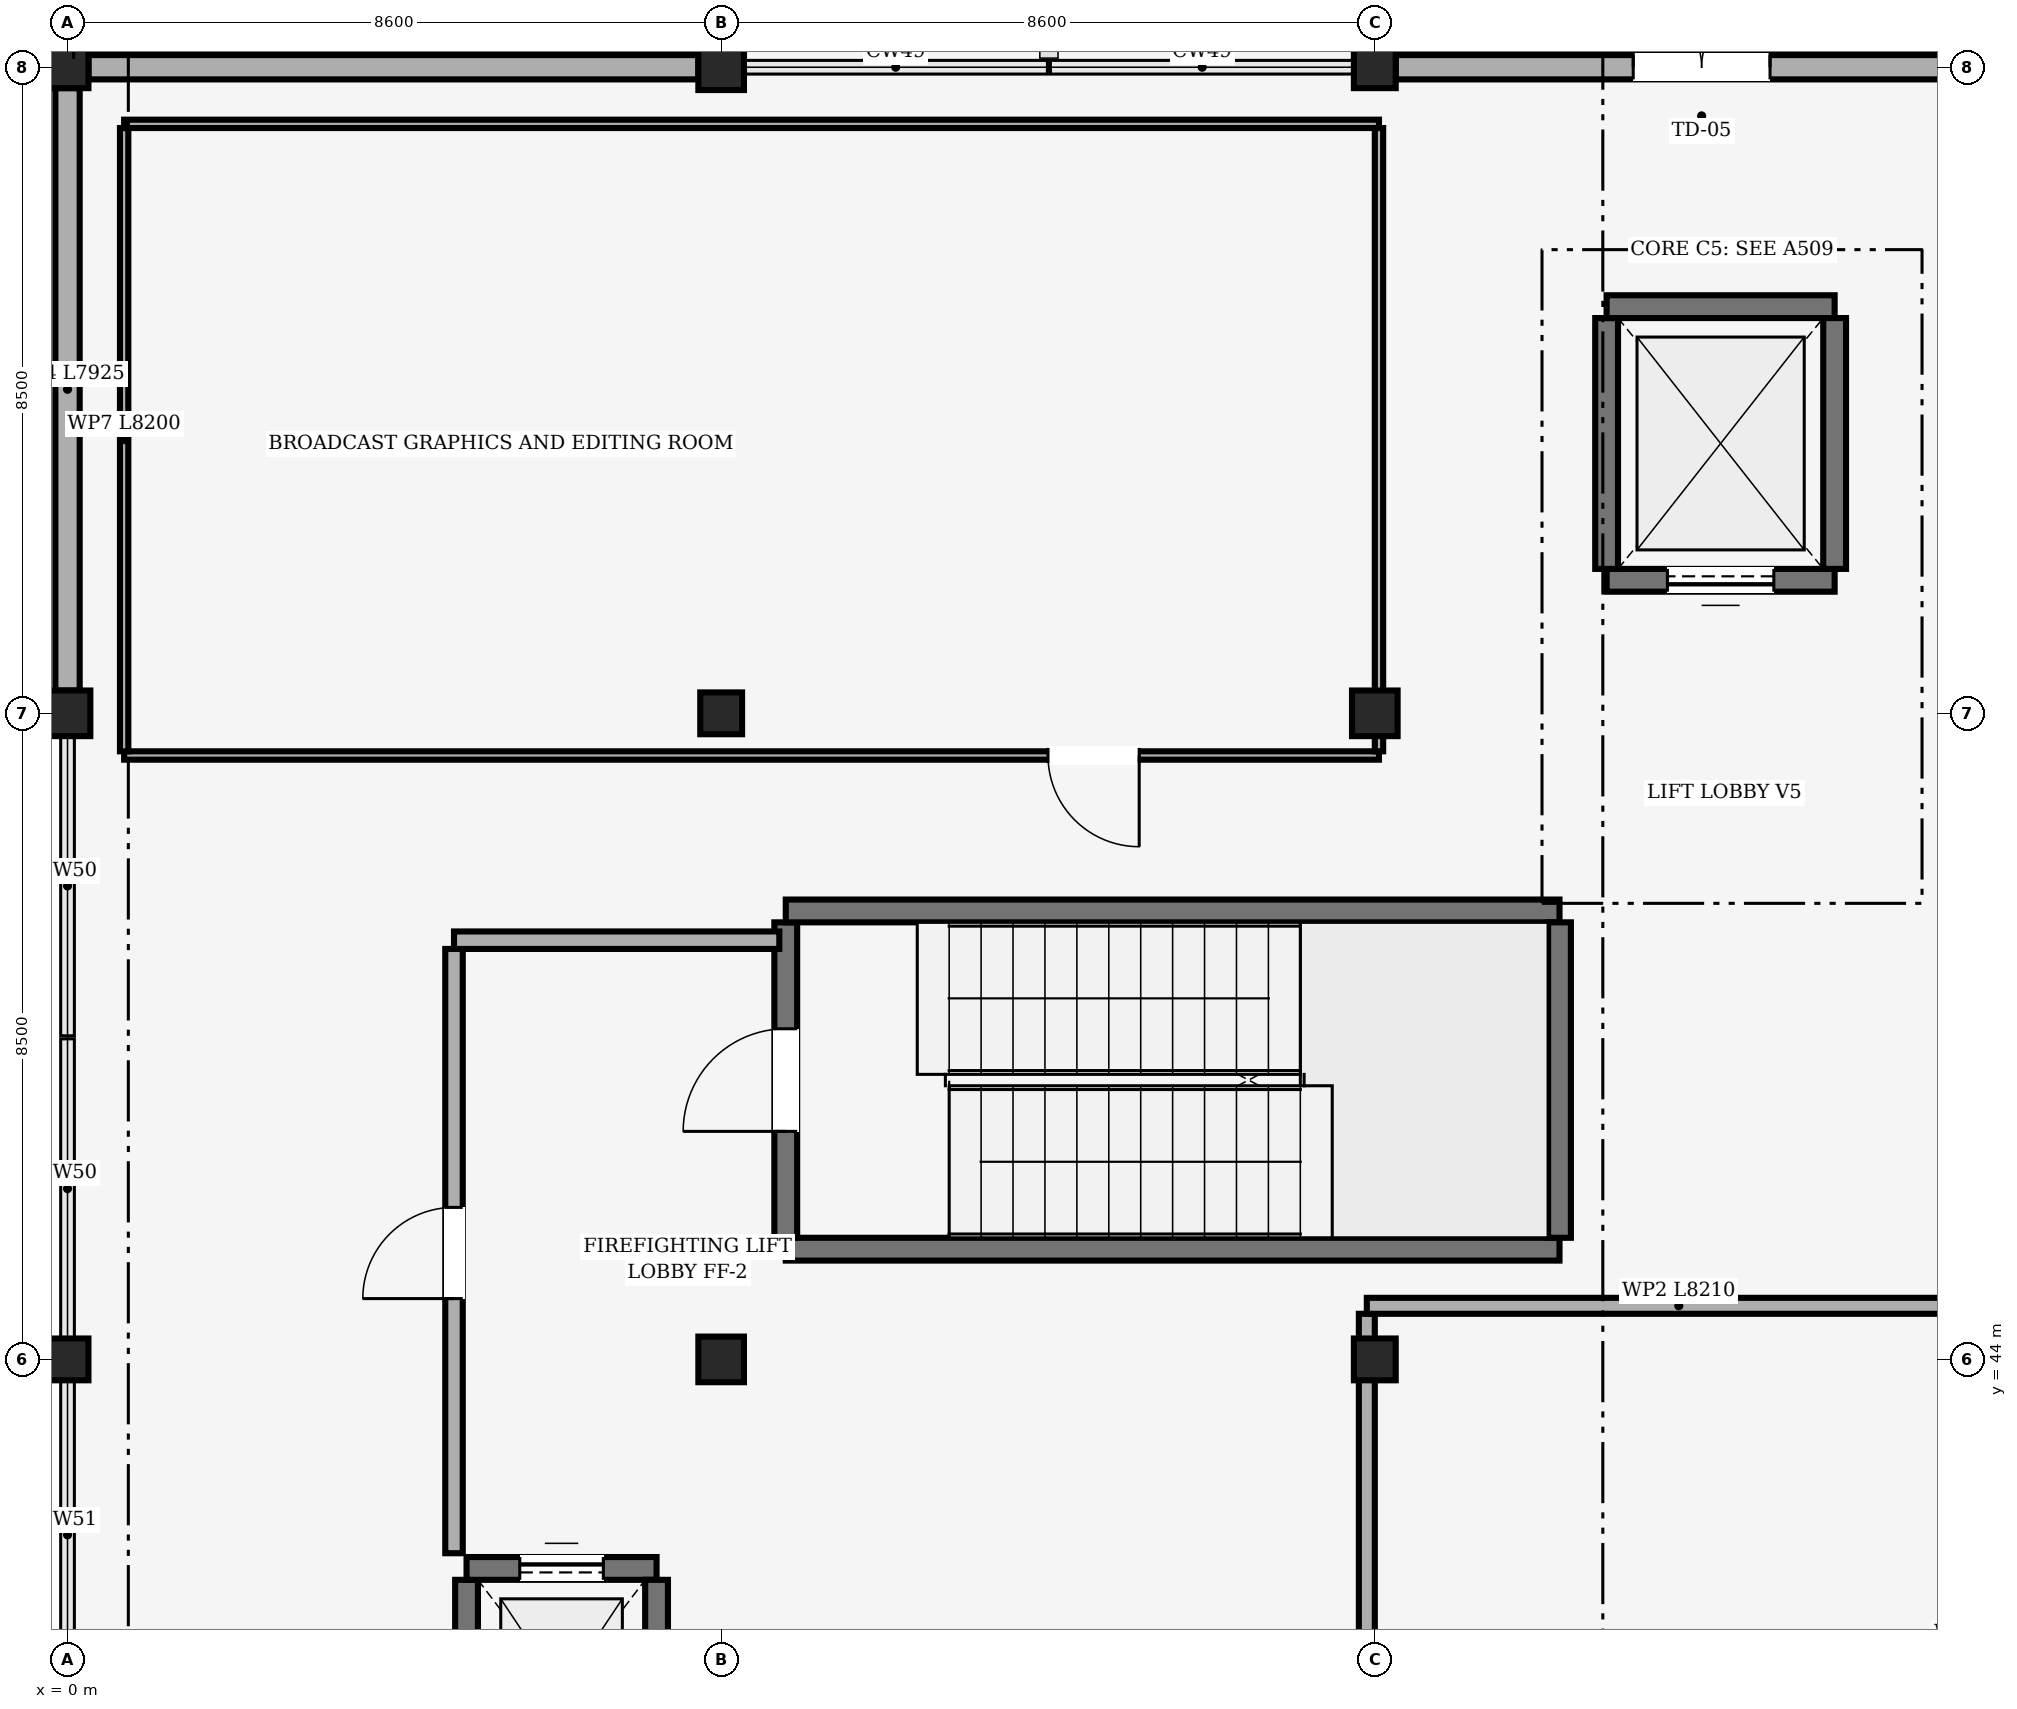
"""IFC4 building model, lengths in metres.
Left out: names, types, materials, properties, quantities, classifications, styles, units other than length and angle.
Written with IfcOpenShell. Run it as: python <this file> out.ifc"""

import sys

from ifc_helpers import new_model, si_unit, direction, frame, frame_2d, origin, origin_2d, place, context, subcontext, project, spatial, rectangle, extrude, element, fill, save


model = new_model("IFC4")
c1 = context("Model", 3, precision=1e-05, world=origin(), true_north=direction((0.0, 1.0)))
c2 = subcontext(c1, "Body", "Model", "MODEL_VIEW")
j1 = project(units=[si_unit("LENGTHUNIT", "METRE"), si_unit("PLANEANGLEUNIT", "RADIAN")], contexts=[c1])
p1 = place(None, origin())
s1 = spatial("IfcSite", under=j1, at=p1, CompositionType="ELEMENT")
p2 = place(p1, origin())
s2 = spatial("IfcBuilding", under=s1, at=p2, CompositionType="ELEMENT")
p3 = place(p2, frame((0.0, 0.0, 15.6)))
s3 = spatial("IfcBuildingStorey", under=s2, at=p3, CompositionType="ELEMENT", Elevation=15.6)
p4 = place(p3, frame((0.0, 44.0, 0.0), z_axis=(0.0, 0.0, 1.0), x_axis=(1.0, 0.0, 0.0)))
e1 = element("IfcColumn", 1, at=p4, inside=s3, PredefinedType="COLUMN", context=c2, shape_type="SweptSolid", body=[
    extrude(rectangle(XDim=0.55, YDim=0.55, at=origin_2d()), origin(), (0.0, 0.0, 1.0), 3.2),
])
p5 = place(p3, frame((0.0, 52.5, 0.0), z_axis=(0.0, 0.0, 1.0), x_axis=(1.0, 0.0, 0.0)))
e2 = element("IfcColumn", 2, at=p5, inside=s3, PredefinedType="COLUMN", context=c2, shape_type="SweptSolid", body=[
    extrude(rectangle(XDim=0.6, YDim=0.6, at=origin_2d()), origin(), (0.0, 0.0, 1.0), 3.2),
])
p6 = place(p3, frame((0.0, 61.0, 0.0), z_axis=(0.0, 0.0, 1.0), x_axis=(1.0, 0.0, 0.0)))
e3 = element("IfcColumn", 3, at=p6, inside=s3, PredefinedType="COLUMN", context=c2, shape_type="SweptSolid", body=[
    extrude(rectangle(XDim=0.55, YDim=0.55, at=origin_2d()), origin(), (0.0, 0.0, 1.0), 3.2),
])
p7 = place(p3, frame((8.6, 44.0, 0.0), z_axis=(0.0, 0.0, 1.0), x_axis=(1.0, 0.0, 0.0)))
e4 = element("IfcColumn", 4, at=p7, inside=s3, PredefinedType="COLUMN", context=c2, shape_type="SweptSolid", body=[
    extrude(rectangle(XDim=0.6, YDim=0.6, at=origin_2d()), origin(), (0.0, 0.0, 1.0), 3.2),
])
p8 = place(p3, frame((8.6, 52.5, 0.0), z_axis=(0.0, 0.0, 1.0), x_axis=(1.0, 0.0, 0.0)))
e5 = element("IfcColumn", 5, at=p8, inside=s3, PredefinedType="COLUMN", context=c2, shape_type="SweptSolid", body=[
    extrude(rectangle(XDim=0.55, YDim=0.55, at=origin_2d()), origin(), (0.0, 0.0, 1.0), 3.2),
])
p9 = place(p3, frame((8.6, 61.0, 0.0), z_axis=(0.0, 0.0, 1.0), x_axis=(1.0, 0.0, 0.0)))
e6 = element("IfcColumn", 6, at=p9, inside=s3, PredefinedType="COLUMN", context=c2, shape_type="SweptSolid", body=[
    extrude(rectangle(XDim=0.6, YDim=0.6, at=origin_2d()), origin(), (0.0, 0.0, 1.0), 3.2),
])
p10 = place(p3, frame((17.2, 44.0, 0.0), z_axis=(0.0, 0.0, 1.0), x_axis=(1.0, 0.0, 0.0)))
e7 = element("IfcColumn", 7, at=p10, inside=s3, PredefinedType="COLUMN", context=c2, shape_type="SweptSolid", body=[
    extrude(rectangle(XDim=0.55, YDim=0.55, at=origin_2d()), origin(), (0.0, 0.0, 1.0), 3.2),
])
p11 = place(p3, frame((17.2, 52.5, 0.0), z_axis=(0.0, 0.0, 1.0), x_axis=(1.0, 0.0, 0.0)))
e8 = element("IfcColumn", 8, at=p11, inside=s3, PredefinedType="COLUMN", context=c2, shape_type="SweptSolid", body=[
    extrude(rectangle(XDim=0.6, YDim=0.6, at=origin_2d()), origin(), (0.0, 0.0, 1.0), 3.2),
])
p12 = place(p3, frame((17.2, 61.0, 0.0), z_axis=(0.0, 0.0, 1.0), x_axis=(1.0, 0.0, 0.0)))
e9 = element("IfcColumn", 9, at=p12, inside=s3, PredefinedType="COLUMN", context=c2, shape_type="SweptSolid", body=[
    extrude(rectangle(XDim=0.55, YDim=0.55, at=origin_2d()), origin(), (0.0, 0.0, 1.0), 3.2),
])
p13 = place(p3, frame((0.275, 61.0, 0.0), z_axis=(0.0, 0.0, 1.0), x_axis=(1.0, 0.0, 0.0)))
e10 = element("IfcWall", 10, at=p13, inside=s3, PredefinedType="SOLIDWALL", context=c2, shape_type="SweptSolid", body=[
    extrude(rectangle(XDim=8.025, YDim=0.32, at=frame_2d((4.013, 0.0))), origin(), (0.0, 0.0, 1.0), 2.585),
])
p14 = place(p3, frame((17.475, 61.0, 0.0), z_axis=(0.0, 0.0, 1.0), x_axis=(1.0, 0.0, 0.0)))
e11 = element("IfcWall", 11, at=p14, inside=s3, PredefinedType="SOLIDWALL", context=c2, shape_type="SweptSolid", body=[
    extrude(rectangle(XDim=8.025, YDim=0.32, at=frame_2d((4.012, 0.0))), origin(), (0.0, 0.0, 1.0), 2.535),
])
p15 = place(p14, frame((3.125, 0.0, 0.0)))
e12 = element("IfcOpeningElement", 12, at=p15, cuts=e11, PredefinedType="OPENING", context=c2, shape_type="SweptSolid", body=[
    extrude(rectangle(XDim=1.8, YDim=2.2, at=frame_2d((0.9, 1.1))), frame((0.0, 0.16, 0.0), z_axis=(0.0, -1.0, 0.0), x_axis=(1.0, 0.0, 0.0)), (0.0, 0.0, 1.0), 0.32),
])
p16 = place(p3, frame((0.0, 60.725, 0.0), z_axis=(0.0, 0.0, 1.0), x_axis=(0.0, -1.0, 0.0)))
e13 = element("IfcWall", 13, at=p16, inside=s3, PredefinedType="SOLIDWALL", context=c2, shape_type="SweptSolid", body=[
    extrude(rectangle(XDim=7.925, YDim=0.32, at=frame_2d((3.962, 0.0))), origin(), (0.0, 0.0, 1.0), 2.435),
])
p17 = place(p3, frame((19.63, 45.45, 0.0), z_axis=(0.0, 0.0, 1.0), x_axis=(-1.0, 0.0, 0.0)))
e14 = element("IfcWall", 14, at=p17, inside=s3, PredefinedType="SHEAR", context=c2, shape_type="SweptSolid", body=[
    extrude(rectangle(XDim=10.18, YDim=0.3, at=frame_2d((5.09, 0.0))), origin(), (0.0, 0.0, 1.0), 3.2),
])
p18 = place(p3, frame((9.45, 45.6, 0.0), z_axis=(0.0, 0.0, 1.0), x_axis=(0.0, 1.0, 0.0)))
e15 = element("IfcWall", 15, at=p18, inside=s3, PredefinedType="SHEAR", context=c2, shape_type="SweptSolid", body=[
    extrude(rectangle(XDim=4.15, YDim=0.3, at=frame_2d((2.075, 0.0))), origin(), (0.0, 0.0, 1.0), 3.2),
])
p19 = place(p18, frame((1.4, 0.0, 0.0)))
e16 = element("IfcOpeningElement", 16, at=p19, cuts=e15, PredefinedType="OPENING", context=c2, shape_type="SweptSolid", body=[
    extrude(rectangle(XDim=1.35, YDim=2.2, at=frame_2d((0.675, 1.1))), frame((0.0, 0.15, 0.0), z_axis=(0.0, -1.0, 0.0), x_axis=(1.0, 0.0, 0.0)), (0.0, 0.0, 1.0), 0.3),
])
p20 = place(p3, frame((9.45, 49.9, 0.0), z_axis=(0.0, 0.0, 1.0), x_axis=(1.0, 0.0, 0.0)))
e17 = element("IfcWall", 17, at=p20, inside=s3, PredefinedType="SHEAR", context=c2, shape_type="SweptSolid", body=[
    extrude(rectangle(XDim=10.18, YDim=0.3, at=frame_2d((5.09, 0.0))), origin(), (0.0, 0.0, 1.0), 3.2),
])
p21 = place(p3, frame((19.63, 49.75, 0.0), z_axis=(0.0, 0.0, 1.0), x_axis=(0.0, -1.0, 0.0)))
e18 = element("IfcWall", 18, at=p21, inside=s3, PredefinedType="SHEAR", context=c2, shape_type="SweptSolid", body=[
    extrude(rectangle(XDim=4.15, YDim=0.3, at=frame_2d((2.075, 0.0))), origin(), (0.0, 0.0, 1.0), 3.2),
])
p22 = place(p3, frame((5.25, 38.2, 0.0), z_axis=(0.0, 0.0, 1.0), x_axis=(0.0, 1.0, 0.0)))
e19 = element("IfcWall", 19, at=p22, inside=s3, PredefinedType="SHEAR", context=c2, shape_type="SweptSolid", body=[
    extrude(rectangle(XDim=2.9, YDim=0.3, at=frame_2d((1.45, 0.0))), origin(), (0.0, 0.0, 1.0), 3.2),
])
p23 = place(p3, frame((5.25, 41.25, 0.0), z_axis=(0.0, 0.0, 1.0), x_axis=(1.0, 0.0, 0.0)))
e20 = element("IfcWall", 20, at=p23, inside=s3, PredefinedType="SHEAR", context=c2, shape_type="SweptSolid", body=[
    extrude(rectangle(XDim=2.5, YDim=0.3, at=frame_2d((1.25, 0.0))), origin(), (0.0, 0.0, 1.0), 3.2),
])
p24 = place(p23, frame((0.7, 0.0, 0.0)))
e21 = element("IfcOpeningElement", 21, at=p24, cuts=e20, PredefinedType="OPENING", context=c2, shape_type="SweptSolid", body=[
    extrude(rectangle(XDim=1.1, YDim=2.1, at=frame_2d((0.55, 1.05))), frame((0.0, 0.15, 0.0), z_axis=(0.0, -1.0, 0.0), x_axis=(1.0, 0.0, 0.0)), (0.0, 0.0, 1.0), 0.3),
])
p25 = place(p3, frame((7.75, 41.1, 0.0), z_axis=(0.0, 0.0, 1.0), x_axis=(0.0, -1.0, 0.0)))
e22 = element("IfcWall", 22, at=p25, inside=s3, PredefinedType="SHEAR", context=c2, shape_type="SweptSolid", body=[
    extrude(rectangle(XDim=2.9, YDim=0.3, at=frame_2d((1.45, 0.0))), origin(), (0.0, 0.0, 1.0), 3.2),
])
p26 = place(p3, frame((23.25, 54.25, 0.0), z_axis=(0.0, 0.0, 1.0), x_axis=(-1.0, 0.0, 0.0)))
e23 = element("IfcWall", 23, at=p26, inside=s3, PredefinedType="SHEAR", context=c2, shape_type="SweptSolid", body=[
    extrude(rectangle(XDim=3.0, YDim=0.3, at=frame_2d((1.5, 0.0))), origin(), (0.0, 0.0, 1.0), 3.2),
])
p27 = place(p26, frame((0.8, 0.0, 0.0)))
e24 = element("IfcOpeningElement", 24, at=p27, cuts=e23, PredefinedType="OPENING", context=c2, shape_type="SweptSolid", body=[
    extrude(rectangle(XDim=1.4, YDim=2.2, at=frame_2d((0.7, 1.1))), frame((0.0, 0.15, 0.0), z_axis=(0.0, -1.0, 0.0), x_axis=(1.0, 0.0, 0.0)), (0.0, 0.0, 1.0), 0.3),
])
p28 = place(p3, frame((20.25, 54.4, 0.0), z_axis=(0.0, 0.0, 1.0), x_axis=(0.0, 1.0, 0.0)))
e25 = element("IfcWall", 25, at=p28, inside=s3, PredefinedType="SHEAR", context=c2, shape_type="SweptSolid", body=[
    extrude(rectangle(XDim=3.3, YDim=0.3, at=frame_2d((1.65, 0.0))), origin(), (0.0, 0.0, 1.0), 3.2),
])
p29 = place(p3, frame((20.25, 57.85, 0.0), z_axis=(0.0, 0.0, 1.0), x_axis=(1.0, 0.0, 0.0)))
e26 = element("IfcWall", 26, at=p29, inside=s3, PredefinedType="SHEAR", context=c2, shape_type="SweptSolid", body=[
    extrude(rectangle(XDim=3.0, YDim=0.3, at=frame_2d((1.5, 0.0))), origin(), (0.0, 0.0, 1.0), 3.2),
])
p30 = place(p3, frame((23.25, 57.7, 0.0), z_axis=(0.0, 0.0, 1.0), x_axis=(0.0, -1.0, 0.0)))
e27 = element("IfcWall", 27, at=p30, inside=s3, PredefinedType="SHEAR", context=c2, shape_type="SweptSolid", body=[
    extrude(rectangle(XDim=3.3, YDim=0.3, at=frame_2d((1.65, 0.0))), origin(), (0.0, 0.0, 1.0), 3.2),
])
p31 = place(p3, frame((5.085, 41.45, 0.0), z_axis=(0.0, 0.0, 1.0), x_axis=(0.0, 1.0, 0.0)))
e28 = element("IfcWall", 28, at=p31, inside=s3, PredefinedType="PARTITIONING", context=c2, shape_type="SweptSolid", body=[
    extrude(rectangle(XDim=7.95, YDim=0.23, at=frame_2d((3.975, 0.0))), origin(), (0.0, 0.0, 1.0), 3.18),
])
p32 = place(p31, frame((3.35, 0.0, 0.0)))
e29 = element("IfcOpeningElement", 29, at=p32, cuts=e28, PredefinedType="OPENING", context=c2, shape_type="SweptSolid", body=[
    extrude(rectangle(XDim=1.2, YDim=2.15, at=frame_2d((0.6, 1.075))), frame((0.0, 0.115, 0.0), z_axis=(0.0, -1.0, 0.0), x_axis=(1.0, 0.0, 0.0)), (0.0, 0.0, 1.0), 0.23),
])
p33 = place(p3, frame((5.085, 49.515, 0.0), z_axis=(0.0, 0.0, 1.0), x_axis=(1.0, 0.0, 0.0)))
e30 = element("IfcWall", 30, at=p33, inside=s3, PredefinedType="PARTITIONING", context=c2, shape_type="SweptSolid", body=[
    extrude(rectangle(XDim=4.28, YDim=0.23, at=frame_2d((2.14, 0.0))), origin(), (0.0, 0.0, 1.0), 3.18),
])
p34 = place(p3, frame((17.095, 35.8, 0.0), z_axis=(0.0, 0.0, 1.0), x_axis=(0.0, 1.0, 0.0)))
e31 = element("IfcWall", 31, at=p34, inside=s3, PredefinedType="PARTITIONING", context=c2, shape_type="SweptSolid", body=[
    extrude(rectangle(XDim=8.8, YDim=0.21, at=frame_2d((4.4, 0.0))), origin(), (0.0, 0.0, 1.0), 2.53),
])
p35 = place(p34, frame((3.0, 0.0, 0.0)))
e32 = element("IfcOpeningElement", 32, at=p35, cuts=e31, PredefinedType="OPENING", context=c2, shape_type="SweptSolid", body=[
    extrude(rectangle(XDim=1.4, YDim=2.15, at=frame_2d((0.7, 1.075))), frame((0.0, 0.105, 0.0), z_axis=(0.0, -1.0, 0.0), x_axis=(1.0, 0.0, 0.0)), (0.0, 0.0, 1.0), 0.21),
])
p36 = place(p3, frame((17.095, 44.705, 0.0), z_axis=(0.0, 0.0, 1.0), x_axis=(1.0, 0.0, 0.0)))
e33 = element("IfcWall", 33, at=p36, inside=s3, PredefinedType="PARTITIONING", context=c2, shape_type="SweptSolid", body=[
    extrude(rectangle(XDim=8.21, YDim=0.21, at=frame_2d((4.105, 0.0))), origin(), (0.0, 0.0, 1.0), 3.18),
])
p37 = place(p3, frame((17.255, 51.945, 0.0), z_axis=(0.0, 0.0, 1.0), x_axis=(-1.0, 0.0, 0.0)))
e34 = element("IfcWall", 34, at=p37, inside=s3, PredefinedType="PARTITIONING", context=c2, shape_type="SweptSolid", body=[
    extrude(rectangle(XDim=16.51, YDim=0.11, at=frame_2d((8.255, 0.0))), origin(), (0.0, 0.0, 1.0), 3.18),
])
p38 = place(p37, frame((3.155, 0.0, 0.0)))
e35 = element("IfcOpeningElement", 35, at=p38, cuts=e34, PredefinedType="OPENING", context=c2, shape_type="SweptSolid", body=[
    extrude(rectangle(XDim=1.2, YDim=2.15, at=frame_2d((0.6, 1.075))), frame((0.0, 0.055, 0.0), z_axis=(0.0, -1.0, 0.0), x_axis=(1.0, 0.0, 0.0)), (0.0, 0.0, 1.0), 0.11),
])
p39 = place(p3, frame((0.745, 52.0, 0.0), z_axis=(0.0, 0.0, 1.0), x_axis=(0.0, 1.0, 0.0)))
e36 = element("IfcWall", 36, at=p39, inside=s3, PredefinedType="PARTITIONING", context=c2, shape_type="SweptSolid", body=[
    extrude(rectangle(XDim=8.2, YDim=0.11, at=frame_2d((4.1, 0.0))), origin(), (0.0, 0.0, 1.0), 3.18),
])
p40 = place(p3, frame((0.745, 60.255, 0.0), z_axis=(0.0, 0.0, 1.0), x_axis=(1.0, 0.0, 0.0)))
e37 = element("IfcWall", 37, at=p40, inside=s3, PredefinedType="PARTITIONING", context=c2, shape_type="SweptSolid", body=[
    extrude(rectangle(XDim=16.51, YDim=0.11, at=frame_2d((8.255, 0.0))), origin(), (0.0, 0.0, 1.0), 3.18),
])
p41 = place(p3, frame((17.255, 60.2, 0.0), z_axis=(0.0, 0.0, 1.0), x_axis=(0.0, -1.0, 0.0)))
e38 = element("IfcWall", 38, at=p41, inside=s3, PredefinedType="PARTITIONING", context=c2, shape_type="SweptSolid", body=[
    extrude(rectangle(XDim=8.2, YDim=0.11, at=frame_2d((4.1, 0.0))), origin(), (0.0, 0.0, 1.0), 2.58),
])
p42 = place(p15, origin())
e39 = element("IfcDoor", 39, at=p42, inside=s3, OperationType="DOUBLE_DOOR_SINGLE_SWING", PredefinedType="DOOR", context=c2, shape_type="SweptSolid", body=[
    extrude(rectangle(XDim=1.8, YDim=2.2, at=frame_2d((0.9, 1.1))), frame((0.0, 0.025, 0.0), z_axis=(0.0, -1.0, 0.0), x_axis=(1.0, 0.0, 0.0)), (0.0, 0.0, 1.0), 0.05),
])
fill(e12, e39)
p43 = place(p19, origin())
e40 = element("IfcDoor", 40, at=p43, inside=s3, OperationType="SINGLE_SWING_LEFT", PredefinedType="DOOR", context=c2, shape_type="SweptSolid", body=[
    extrude(rectangle(XDim=1.35, YDim=2.2, at=frame_2d((0.675, 1.1))), frame((0.0, 0.025, 0.0), z_axis=(0.0, -1.0, 0.0), x_axis=(1.0, 0.0, 0.0)), (0.0, 0.0, 1.0), 0.05),
])
fill(e16, e40)
p44 = place(p24, origin())
e41 = element("IfcDoor", 41, at=p44, inside=s3, OperationType="SLIDING_TO_LEFT", PredefinedType="DOOR", context=c2, shape_type="SweptSolid", body=[
    extrude(rectangle(XDim=1.1, YDim=2.1, at=frame_2d((0.55, 1.05))), frame((0.0, 0.025, 0.0), z_axis=(0.0, -1.0, 0.0), x_axis=(1.0, 0.0, 0.0)), (0.0, 0.0, 1.0), 0.05),
])
fill(e21, e41)
p45 = place(p27, origin())
e42 = element("IfcDoor", 42, at=p45, inside=s3, OperationType="DOUBLE_DOOR_SLIDING", PredefinedType="DOOR", context=c2, shape_type="SweptSolid", body=[
    extrude(rectangle(XDim=1.4, YDim=2.2, at=frame_2d((0.7, 1.1))), frame((0.0, 0.025, 0.0), z_axis=(0.0, -1.0, 0.0), x_axis=(1.0, 0.0, 0.0)), (0.0, 0.0, 1.0), 0.05),
])
fill(e24, e42)
p46 = place(p32, origin())
e43 = element("IfcDoor", 43, at=p46, inside=s3, OperationType="SINGLE_SWING_LEFT", PredefinedType="DOOR", context=c2, shape_type="SweptSolid", body=[
    extrude(rectangle(XDim=1.2, YDim=2.15, at=frame_2d((0.6, 1.075))), frame((0.0, 0.025, 0.0), z_axis=(0.0, -1.0, 0.0), x_axis=(1.0, 0.0, 0.0)), (0.0, 0.0, 1.0), 0.05),
])
fill(e29, e43)
p47 = place(p38, origin())
e44 = element("IfcDoor", 44, at=p47, inside=s3, OperationType="SINGLE_SWING_LEFT", PredefinedType="DOOR", context=c2, shape_type="SweptSolid", body=[
    extrude(rectangle(XDim=1.2, YDim=2.15, at=frame_2d((0.6, 1.075))), frame((0.0, 0.025, 0.0), z_axis=(0.0, -1.0, 0.0), x_axis=(1.0, 0.0, 0.0)), (0.0, 0.0, 1.0), 0.05),
])
fill(e35, e44)
save(model, sys.argv[1])
